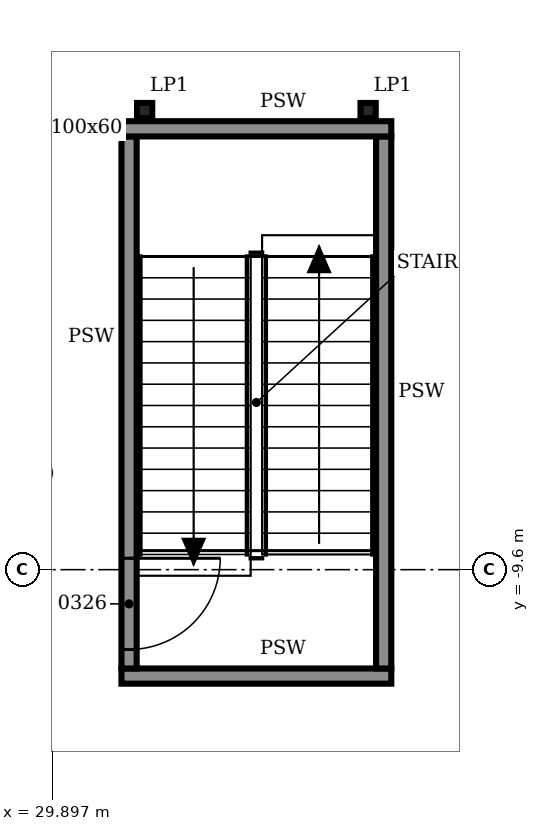
"""IFC4 building model, lengths in metres.
Left out: names, types, materials, properties, quantities, classifications, styles, units other than length and angle.
Written with IfcOpenShell. Run it as: python <this file> out.ifc"""

import sys

from ifc_helpers import new_model, si_unit, direction, frame, frame_2d, origin, origin_2d, place, context, subcontext, project, spatial, rectangle, i_section, extrude, element, fill, save


model = new_model("IFC4")
c1 = context("Model", 3, precision=1e-05, world=origin(), true_north=direction((0.0, 1.0)))
c2 = subcontext(c1, "Body", "Model", "MODEL_VIEW")
j1 = project(units=[si_unit("LENGTHUNIT", "METRE"), si_unit("PLANEANGLEUNIT", "RADIAN")], contexts=[c1])
p1 = place(None, origin())
s1 = spatial("IfcSite", under=j1, at=p1, CompositionType="ELEMENT")
p2 = place(p1, origin())
s2 = spatial("IfcBuilding", under=s1, at=p2, CompositionType="ELEMENT")
p3 = place(p2, frame((0.0, 0.0, 21.0)))
s3 = spatial("IfcBuildingStorey", under=s2, at=p3, CompositionType="ELEMENT", Elevation=21.0)
for number, where, z_axis, x_axis in (
    (1, (31.105, -3.56, 0.0), (0.0, 0.0, 1.0), (1.0, 0.0, 0.0)),
    (2, (34.045, -3.56, 0.0), (0.0, 0.0, 1.0), (1.0, 0.0, 0.0)),
):
    element("IfcColumn", number, at=place(p3, frame(where, z_axis=z_axis, x_axis=x_axis)), inside=s3, PredefinedType="COLUMN", context=c2, shape_type="SweptSolid", body=[
        extrude(i_section(OverallWidth=0.2, OverallDepth=0.2, WebThickness=0.009, FlangeThickness=0.015, FilletRadius=0.018, at=origin_2d()), origin(), (0.0, 0.0, 1.0), 4.8),
    ])
p4 = place(p3, frame((30.8, -11.0, 0.0), z_axis=(0.0, 0.0, 1.0), x_axis=(1.0, 0.0, 0.0)))
e3 = element("IfcWall", 3, at=p4, inside=s3, PredefinedType="SOLIDWALL", context=c2, shape_type="SweptSolid", body=[
    extrude(rectangle(XDim=3.55, YDim=0.2, at=frame_2d((1.775, 0.0))), origin(), (0.0, 0.0, 1.0), 4.6),
])
p5 = place(p3, frame((30.9, -10.9, 0.0), z_axis=(0.0, 0.0, 1.0), x_axis=(0.0, 1.0, 0.0)))
e4 = element("IfcWall", 4, at=p5, inside=s3, PredefinedType="SOLIDWALL", context=c2, shape_type="SweptSolid", body=[
    extrude(rectangle(XDim=7.0, YDim=0.2, at=frame_2d((3.5, 0.0))), origin(), (0.0, 0.0, 1.0), 4.6),
])
p6 = place(p5, frame((0.25, 0.0, 0.0)))
e5 = element("IfcOpeningElement", 5, at=p6, cuts=e4, PredefinedType="OPENING", context=c2, shape_type="SweptSolid", body=[
    extrude(rectangle(XDim=1.2, YDim=2.1, at=frame_2d((0.6, 1.05))), frame((0.0, 0.11, 0.0), z_axis=(0.0, -1.0, 0.0), x_axis=(1.0, 0.0, 0.0)), (0.0, 0.0, 1.0), 0.22),
])
p7 = place(p3, frame((34.25, -10.9, 0.0), z_axis=(0.0, 0.0, 1.0), x_axis=(0.0, 1.0, 0.0)))
e6 = element("IfcWall", 6, at=p7, inside=s3, PredefinedType="SOLIDWALL", context=c2, shape_type="SweptSolid", body=[
    extrude(rectangle(XDim=7.0, YDim=0.2, at=frame_2d((3.5, 0.0))), origin(), (0.0, 0.0, 1.0), 4.6),
])
p8 = place(p3, frame((30.8, -3.8, 0.0), z_axis=(0.0, 0.0, 1.0), x_axis=(1.0, 0.0, 0.0)))
e7 = element("IfcWall", 7, at=p8, inside=s3, PredefinedType="SOLIDWALL", context=c2, shape_type="SweptSolid", body=[
    extrude(rectangle(XDim=3.55, YDim=0.2, at=frame_2d((1.775, 0.0))), origin(), (0.0, 0.0, 1.0), 4.6),
])
p9 = place(p6, frame((1.2, 0.0, 0.0), z_axis=(0.0, 0.0, 1.0), x_axis=(-1.0, 0.0, 0.0)))
e8 = element("IfcDoor", 8, at=p9, inside=s3, OperationType="SINGLE_SWING_LEFT", PredefinedType="DOOR", context=c2, shape_type="SweptSolid", body=[
    extrude(rectangle(XDim=1.2, YDim=2.1, at=frame_2d((0.6, 1.05))), frame((0.0, 0.025, 0.0), z_axis=(0.0, -1.0, 0.0), x_axis=(1.0, 0.0, 0.0)), (0.0, 0.0, 1.0), 0.05),
])
fill(e5, e8)
save(model, sys.argv[1])
